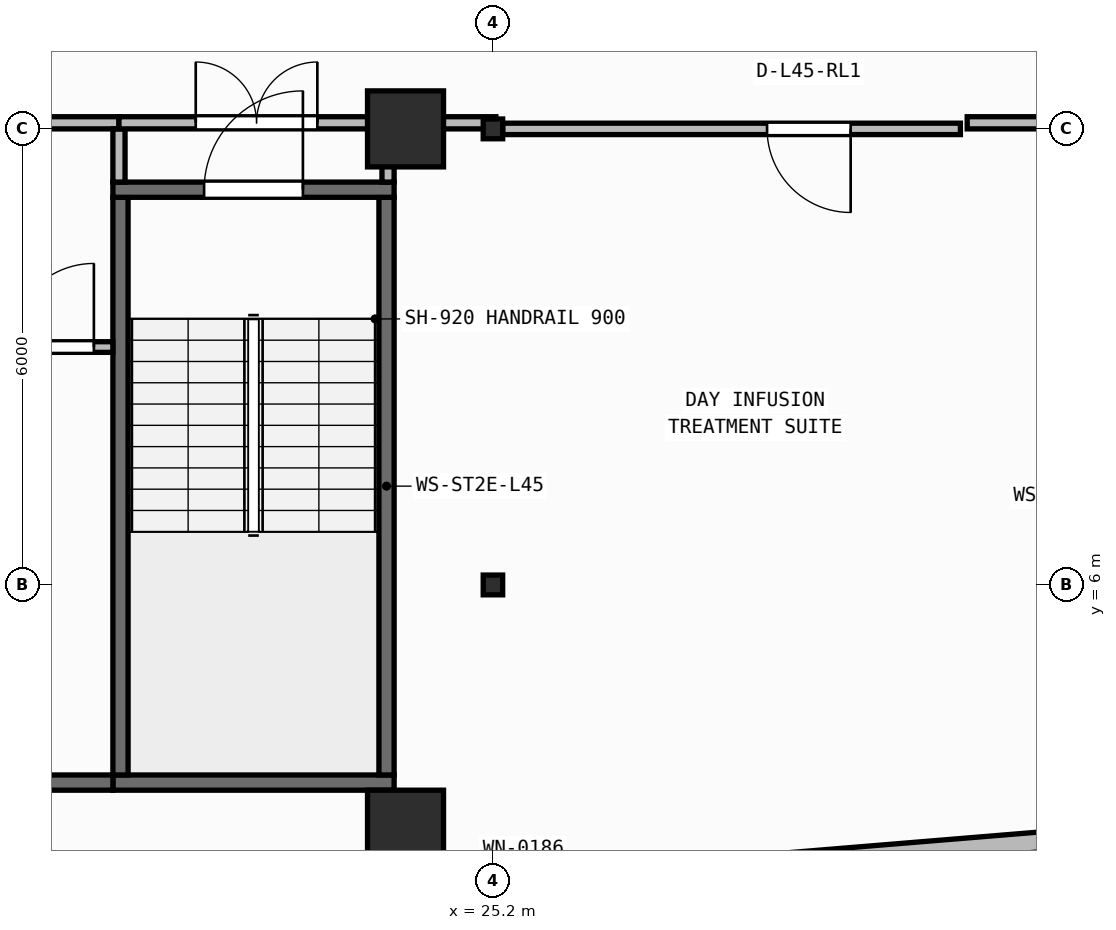
"""IFC4 building model, lengths in metres.
Left out: names, types, materials, properties, quantities, classifications, styles, units other than length and angle.
Written with IfcOpenShell. Run it as: python <this file> out.ifc"""

import sys

from ifc_helpers import new_model, si_unit, direction, frame, frame_2d, origin, origin_2d, place, context, subcontext, project, spatial, rectangle, i_section, extrude, element, fill, save


model = new_model("IFC4")
c1 = context("Model", 3, precision=1e-05, world=origin(), true_north=direction((0.0, 1.0)))
c2 = subcontext(c1, "Body", "Model", "MODEL_VIEW")
j1 = project(units=[si_unit("LENGTHUNIT", "METRE"), si_unit("PLANEANGLEUNIT", "RADIAN")], contexts=[c1])
p1 = place(None, origin())
s1 = spatial("IfcSite", under=j1, at=p1, CompositionType="ELEMENT")
p2 = place(p1, origin())
s2 = spatial("IfcBuilding", under=s1, at=p2, CompositionType="ELEMENT")
p3 = place(p2, frame((0.0, 0.0, 184.2)))
s3 = spatial("IfcBuildingStorey", under=s2, at=p3, CompositionType="ELEMENT", Elevation=184.2)
p4 = place(p3, frame((24.05, 2.8, 0.0), z_axis=(0.0, 0.0, 1.0), x_axis=(1.0, 0.0, 0.0)))
e1 = element("IfcColumn", 1, at=p4, inside=s3, PredefinedType="COLUMN", context=c2, shape_type="SweptSolid", body=[
    extrude(rectangle(XDim=1.0, YDim=1.0, at=origin_2d()), origin(), (0.0, 0.0, 1.0), 3.95),
])
p5 = place(p3, frame((25.2, 6.0, 0.0), z_axis=(0.0, 0.0, 1.0), x_axis=(1.0, 0.0, 0.0)))
e2 = element("IfcColumn", 2, at=p5, inside=s3, PredefinedType="COLUMN", context=c2, shape_type="SweptSolid", body=[
    extrude(i_section(OverallWidth=0.256, OverallDepth=0.26, WebThickness=0.01, FlangeThickness=0.017, FilletRadius=0.013, at=origin_2d()), origin(), (0.0, 0.0, 1.0), 3.95),
])
p6 = place(p3, frame((24.05, 12.0, 0.0), z_axis=(0.0, 0.0, 1.0), x_axis=(1.0, 0.0, 0.0)))
e3 = element("IfcColumn", 3, at=p6, inside=s3, PredefinedType="COLUMN", context=c2, shape_type="SweptSolid", body=[
    extrude(rectangle(XDim=1.0, YDim=1.0, at=origin_2d()), origin(), (0.0, 0.0, 1.0), 3.95),
])
p7 = place(p3, frame((25.2, 12.0, 0.0), z_axis=(0.0, 0.0, 1.0), x_axis=(1.0, 0.0, 0.0)))
e4 = element("IfcColumn", 4, at=p7, inside=s3, PredefinedType="COLUMN", context=c2, shape_type="SweptSolid", body=[
    extrude(i_section(OverallWidth=0.256, OverallDepth=0.26, WebThickness=0.01, FlangeThickness=0.017, FilletRadius=0.013, at=origin_2d()), origin(), (0.0, 0.0, 1.0), 3.95),
])
p8 = place(p3, frame((2.66, 0.174, 0.0), z_axis=(0.0, 0.0, 1.0), x_axis=(0.996634028439, 0.081979347142, 0.0)))
e5 = element("IfcWall", 5, at=p8, inside=s3, PredefinedType="STANDARD", context=c2, shape_type="SweptSolid", body=[
    extrude(rectangle(XDim=46.035, YDim=0.26, at=frame_2d((23.018, 0.0))), origin(), (0.0, 0.0, 1.0), 3.71),
])
p9 = place(p8, frame((21.817, 0.0, 0.9)))
e6 = element("IfcOpeningElement", 6, at=p9, cuts=e5, PredefinedType="OPENING", context=c2, shape_type="SweptSolid", body=[
    extrude(rectangle(XDim=2.4, YDim=1.65, at=frame_2d((1.2, 0.825))), frame((0.0, 0.14, 0.0), z_axis=(0.0, -1.0, 0.0), x_axis=(1.0, 0.0, 0.0)), (0.0, 0.0, 1.0), 0.28),
])
p10 = place(p3, frame((20.2, 3.4, 0.0), z_axis=(0.0, 0.0, 1.0), x_axis=(1.0, 0.0, 0.0)))
e7 = element("IfcWall", 7, at=p10, inside=s3, PredefinedType="SHEAR", context=c2, shape_type="SweptSolid", body=[
    extrude(rectangle(XDim=3.7, YDim=0.2, at=frame_2d((1.85, 0.0))), origin(), (0.0, 0.0, 1.0), 3.71),
])
for number, where, z_axis, x_axis in (
    (8, (20.3, 3.5, 0.0), (0.0, 0.0, 1.0), (0.0, 1.0, 0.0)),
    (9, (23.8, 3.5, 0.0), (0.0, 0.0, 1.0), (0.0, 1.0, 0.0)),
):
    element("IfcWall", number, at=place(p3, frame(where, z_axis=z_axis, x_axis=x_axis)), inside=s3, PredefinedType="SHEAR", context=c2, shape_type="SweptSolid", body=[
        extrude(rectangle(XDim=7.6, YDim=0.2, at=frame_2d((3.8, 0.0))), origin(), (0.0, 0.0, 1.0), 3.71),
    ])
p11 = place(p3, frame((20.2, 11.2, 0.0), z_axis=(0.0, 0.0, 1.0), x_axis=(1.0, 0.0, 0.0)))
e10 = element("IfcWall", 10, at=p11, inside=s3, PredefinedType="SHEAR", context=c2, shape_type="SweptSolid", body=[
    extrude(rectangle(XDim=3.7, YDim=0.2, at=frame_2d((1.85, 0.0))), origin(), (0.0, 0.0, 1.0), 3.71),
])
p12 = place(p11, frame((1.2, 0.0, 0.0)))
e11 = element("IfcOpeningElement", 11, at=p12, cuts=e10, PredefinedType="OPENING", context=c2, shape_type="SweptSolid", body=[
    extrude(rectangle(XDim=1.3, YDim=2.15, at=frame_2d((0.65, 1.075))), frame((0.0, 0.11, 0.0), z_axis=(0.0, -1.0, 0.0), x_axis=(1.0, 0.0, 0.0)), (0.0, 0.0, 1.0), 0.22),
])
p13 = place(p3, frame((6.5, 3.4, 0.0), z_axis=(0.0, 0.0, 1.0), x_axis=(1.0, 0.0, 0.0)))
e12 = element("IfcWall", 12, at=p13, inside=s3, PredefinedType="SHEAR", context=c2, shape_type="SweptSolid", body=[
    extrude(rectangle(XDim=13.7, YDim=0.2, at=frame_2d((6.85, 0.0))), origin(), (0.0, 0.0, 1.0), 3.71),
])
p14 = place(p3, frame((18.61, 9.13, 0.0), z_axis=(0.0, 0.0, 1.0), x_axis=(1.0, 0.0, 0.0)))
e13 = element("IfcWall", 13, at=p14, inside=s3, PredefinedType="PARTITIONING", context=c2, shape_type="SweptSolid", body=[
    extrude(rectangle(XDim=1.59, YDim=0.14, at=frame_2d((0.795, 0.0))), origin(), (0.0, 0.0, 1.0), 3.71),
])
p15 = place(p14, frame((0.24, 0.0, 0.0)))
e14 = element("IfcOpeningElement", 14, at=p15, cuts=e13, PredefinedType="OPENING", context=c2, shape_type="SweptSolid", body=[
    extrude(rectangle(XDim=1.1, YDim=2.1, at=frame_2d((0.55, 1.05))), frame((0.0, 0.08, 0.0), z_axis=(0.0, -1.0, 0.0), x_axis=(1.0, 0.0, 0.0)), (0.0, 0.0, 1.0), 0.16),
])
p16 = place(p3, frame((12.58, 12.08, 0.0), z_axis=(0.0, 0.0, 1.0), x_axis=(1.0, 0.0, 0.0)))
e15 = element("IfcWall", 15, at=p16, inside=s3, PredefinedType="PARTITIONING", context=c2, shape_type="SweptSolid", body=[
    extrude(rectangle(XDim=7.7, YDim=0.16, at=frame_2d((3.85, 0.0))), origin(), (0.0, 0.0, 1.0), 3.152),
])
p17 = place(p16, frame((3.05, 0.0, 0.0)))
e16 = element("IfcOpeningElement", 16, at=p17, cuts=e15, PredefinedType="OPENING", context=c2, shape_type="SweptSolid", body=[
    extrude(rectangle(XDim=1.6, YDim=2.05, at=frame_2d((0.8, 1.025))), frame((0.0, 0.09, 0.0), z_axis=(0.0, -1.0, 0.0), x_axis=(1.0, 0.0, 0.0)), (0.0, 0.0, 1.0), 0.18),
])
p18 = place(p3, frame((20.28, 11.3, 0.0), z_axis=(0.0, 0.0, 1.0), x_axis=(0.0, 1.0, 0.0)))
e17 = element("IfcWall", 17, at=p18, inside=s3, PredefinedType="PARTITIONING", context=c2, shape_type="SweptSolid", body=[
    extrude(rectangle(XDim=0.7, YDim=0.16, at=frame_2d((0.35, 0.0))), origin(), (0.0, 0.0, 1.0), 3.71),
])
p19 = place(p3, frame((20.28, 12.08, 0.0), z_axis=(0.0, 0.0, 1.0), x_axis=(1.0, 0.0, 0.0)))
e18 = element("IfcWall", 18, at=p19, inside=s3, PredefinedType="PARTITIONING", context=c2, shape_type="SweptSolid", body=[
    extrude(rectangle(XDim=3.62, YDim=0.16, at=frame_2d((1.81, 0.0))), origin(), (0.0, 0.0, 1.0), 3.152),
])
p20 = place(p19, frame((1.01, 0.0, 0.0)))
e19 = element("IfcOpeningElement", 19, at=p20, cuts=e18, PredefinedType="OPENING", context=c2, shape_type="SweptSolid", body=[
    extrude(rectangle(XDim=1.6, YDim=2.05, at=frame_2d((0.8, 1.025))), frame((0.0, 0.09, 0.0), z_axis=(0.0, -1.0, 0.0), x_axis=(1.0, 0.0, 0.0)), (0.0, 0.0, 1.0), 0.18),
])
p21 = place(p3, frame((23.82, 11.3, 0.0), z_axis=(0.0, 0.0, 1.0), x_axis=(0.0, 1.0, 0.0)))
e20 = element("IfcWall", 20, at=p21, inside=s3, PredefinedType="PARTITIONING", context=c2, shape_type="SweptSolid", body=[
    extrude(rectangle(XDim=0.7, YDim=0.16, at=frame_2d((0.35, 0.0))), origin(), (0.0, 0.0, 1.0), 3.71),
])
p22 = place(p3, frame((31.35, 12.0, 0.0), z_axis=(0.0, 0.0, 1.0), x_axis=(-1.0, 0.0, 0.0)))
e21 = element("IfcWall", 21, at=p22, inside=s3, PredefinedType="PARTITIONING", context=c2, shape_type="SweptSolid", body=[
    extrude(rectangle(XDim=6.022, YDim=0.15, at=frame_2d((3.011, 0.0))), origin(), (0.0, 0.0, 1.0), 3.152),
])
p23 = place(p22, frame((1.444, 0.0, 0.0)))
e22 = element("IfcOpeningElement", 22, at=p23, cuts=e21, PredefinedType="OPENING", context=c2, shape_type="SweptSolid", body=[
    extrude(rectangle(XDim=1.1, YDim=2.1, at=frame_2d((0.55, 1.05))), frame((0.0, 0.085, 0.0), z_axis=(0.0, -1.0, 0.0), x_axis=(1.0, 0.0, 0.0)), (0.0, 0.0, 1.0), 0.17),
])
p24 = place(p3, frame((24.02, 12.08, 0.0), z_axis=(0.0, 0.0, 1.0), x_axis=(1.0, 0.0, 0.0)))
e23 = element("IfcWall", 23, at=p24, inside=s3, PredefinedType="PARTITIONING", context=c2, shape_type="SweptSolid", body=[
    extrude(rectangle(XDim=1.219, YDim=0.16, at=frame_2d((0.609, 0.0))), origin(), (0.0, 0.0, 1.0), 3.152),
])
p25 = place(p3, frame((31.439, 12.08, 0.0), z_axis=(0.0, 0.0, 1.0), x_axis=(1.0, 0.0, 0.0)))
e24 = element("IfcWall", 24, at=p25, inside=s3, PredefinedType="PARTITIONING", context=c2, shape_type="SweptSolid", body=[
    extrude(rectangle(XDim=2.631, YDim=0.16, at=frame_2d((1.315, 0.0))), origin(), (0.0, 0.0, 1.0), 3.152),
])
p26 = place(p12, origin())
e25 = element("IfcDoor", 25, at=p26, inside=s3, OperationType="SINGLE_SWING_RIGHT", PredefinedType="DOOR", context=c2, shape_type="SweptSolid", body=[
    extrude(rectangle(XDim=1.3, YDim=2.15, at=frame_2d((0.65, 1.075))), frame((0.0, 0.025, 0.0), z_axis=(0.0, -1.0, 0.0), x_axis=(1.0, 0.0, 0.0)), (0.0, 0.0, 1.0), 0.05),
])
fill(e11, e25)
p27 = place(p15, origin())
e26 = element("IfcDoor", 26, at=p27, inside=s3, OperationType="SINGLE_SWING_RIGHT", PredefinedType="DOOR", context=c2, shape_type="SweptSolid", body=[
    extrude(rectangle(XDim=1.1, YDim=2.1, at=frame_2d((0.55, 1.05))), frame((0.0, 0.025, 0.0), z_axis=(0.0, -1.0, 0.0), x_axis=(1.0, 0.0, 0.0)), (0.0, 0.0, 1.0), 0.05),
])
fill(e14, e26)
p28 = place(p20, origin())
e27 = element("IfcDoor", 27, at=p28, inside=s3, OperationType="DOUBLE_DOOR_SINGLE_SWING", PredefinedType="DOOR", context=c2, shape_type="SweptSolid", body=[
    extrude(rectangle(XDim=1.6, YDim=2.05, at=frame_2d((0.8, 1.025))), frame((0.0, 0.025, 0.0), z_axis=(0.0, -1.0, 0.0), x_axis=(1.0, 0.0, 0.0)), (0.0, 0.0, 1.0), 0.05),
])
fill(e19, e27)
p29 = place(p23, origin())
e28 = element("IfcDoor", 28, at=p29, inside=s3, OperationType="SINGLE_SWING_LEFT", PredefinedType="DOOR", context=c2, shape_type="SweptSolid", body=[
    extrude(rectangle(XDim=1.1, YDim=2.1, at=frame_2d((0.55, 1.05))), frame((0.0, 0.025, 0.0), z_axis=(0.0, -1.0, 0.0), x_axis=(1.0, 0.0, 0.0)), (0.0, 0.0, 1.0), 0.05),
])
fill(e22, e28)
save(model, sys.argv[1])
